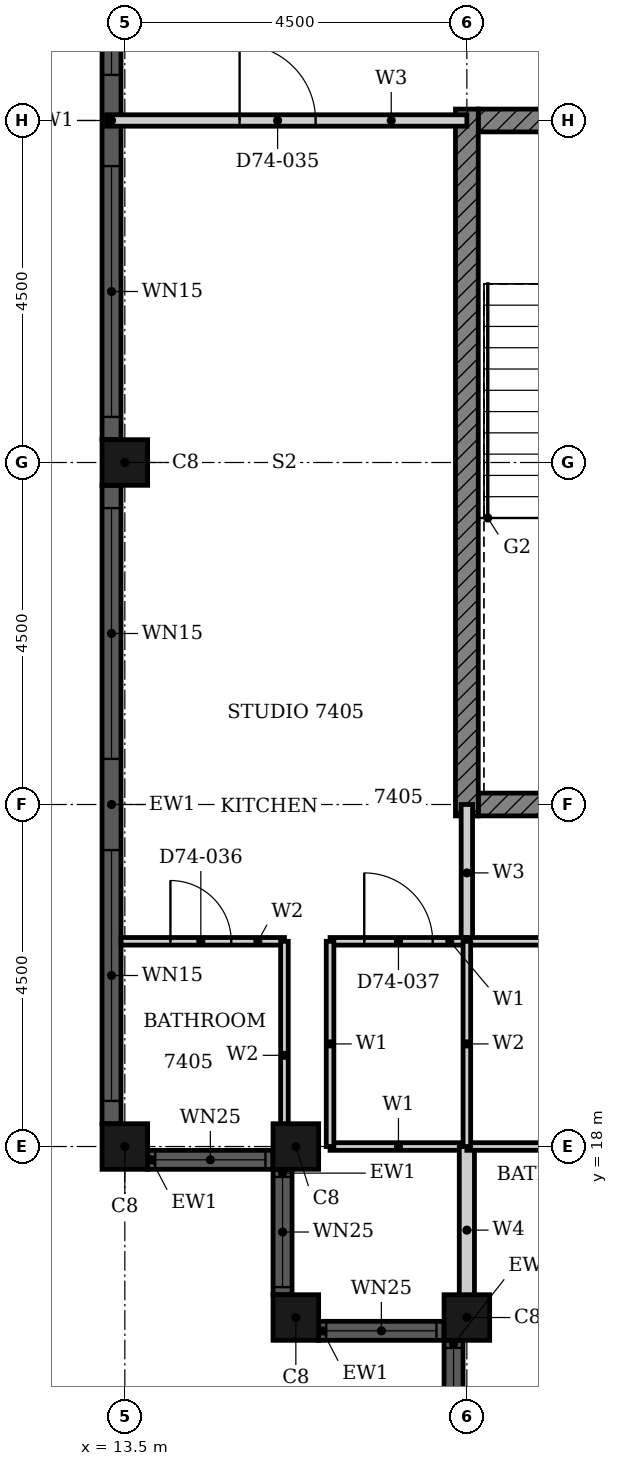
"""IFC4 building model, lengths in metres.
Left out: names, types, materials, properties, quantities, classifications, styles, units other than length and angle.
Written with IfcOpenShell. Run it as: python <this file> out.ifc"""

import sys

from ifc_helpers import new_model, si_unit, direction, frame, frame_2d, origin, origin_2d, place, context, subcontext, project, spatial, rectangle, hollow_rectangle, extrude, element, fill, save


model = new_model("IFC4")
c1 = context("Model", 3, precision=1e-05, world=origin(), true_north=direction((0.0, 1.0)))
c2 = subcontext(c1, "Body", "Model", "MODEL_VIEW")
j1 = project(units=[si_unit("LENGTHUNIT", "METRE"), si_unit("PLANEANGLEUNIT", "RADIAN")], contexts=[c1])
p1 = place(None, origin())
s1 = spatial("IfcSite", under=j1, at=p1, CompositionType="ELEMENT")
p2 = place(p1, origin())
s2 = spatial("IfcBuilding", under=s1, at=p2, CompositionType="ELEMENT")
p3 = place(p2, frame((0.0, 0.0, 290.8)))
s3 = spatial("IfcBuildingStorey", under=s2, at=p3, CompositionType="ELEMENT", Elevation=290.8)
for number, where, z_axis, x_axis in (
    (1, (13.5, 27.0, 0.0), (0.0, 0.0, 1.0), (1.0, 0.0, 0.0)),
    (2, (13.5, 18.0, 0.0), (0.0, 0.0, 1.0), (1.0, 0.0, 0.0)),
    (3, (15.75, 18.0, 0.0), (0.0, 0.0, 1.0), (1.0, 0.0, 0.0)),
    (4, (15.75, 15.75, 0.0), (0.0, 0.0, 1.0), (1.0, 0.0, 0.0)),
    (5, (18.0, 15.75, 0.0), (0.0, 0.0, 1.0), (1.0, 0.0, 0.0)),
):
    element("IfcColumn", number, at=place(p3, frame(where, z_axis=z_axis, x_axis=x_axis)), inside=s3, PredefinedType="COLUMN", context=c2, shape_type="SweptSolid", body=[
        extrude(hollow_rectangle(XDim=0.6, YDim=0.6, WallThickness=0.02, at=origin_2d()), origin(), (0.0, 0.0, 1.0), 3.7),
    ])
p4 = place(p3, frame((13.325, 35.7, 0.0), z_axis=(0.0, 0.0, 1.0), x_axis=(0.0, -1.0, 0.0)))
e6 = element("IfcWall", 6, at=p4, inside=s3, PredefinedType="SOLIDWALL", context=c2, shape_type="SweptSolid", body=[
    extrude(rectangle(XDim=8.4, YDim=0.25, at=frame_2d((4.2, 0.0))), origin(), (0.0, 0.0, 1.0), 3.7),
])
p5 = place(p4, frame((0.3, 0.0, 0.45)))
e7 = element("IfcOpeningElement", 7, at=p5, cuts=e6, PredefinedType="OPENING", context=c2, shape_type="SweptSolid", body=[
    extrude(rectangle(XDim=3.3, YDim=2.3, at=frame_2d((1.65, 1.15))), frame((0.0, 0.135, 0.0), z_axis=(0.0, -1.0, 0.0), x_axis=(1.0, 0.0, 0.0)), (0.0, 0.0, 1.0), 0.27),
])
p6 = place(p4, frame((4.8, 0.0, 0.45)))
e8 = element("IfcOpeningElement", 8, at=p6, cuts=e6, PredefinedType="OPENING", context=c2, shape_type="SweptSolid", body=[
    extrude(rectangle(XDim=3.3, YDim=2.3, at=frame_2d((1.65, 1.15))), frame((0.0, 0.135, 0.0), z_axis=(0.0, -1.0, 0.0), x_axis=(1.0, 0.0, 0.0)), (0.0, 0.0, 1.0), 0.27),
])
p7 = place(p3, frame((13.325, 26.7, 0.0), z_axis=(0.0, 0.0, 1.0), x_axis=(0.0, -1.0, 0.0)))
e9 = element("IfcWall", 9, at=p7, inside=s3, PredefinedType="SOLIDWALL", context=c2, shape_type="SweptSolid", body=[
    extrude(rectangle(XDim=8.4, YDim=0.25, at=frame_2d((4.2, 0.0))), origin(), (0.0, 0.0, 1.0), 3.7),
])
p8 = place(p7, frame((0.3, 0.0, 0.45)))
e10 = element("IfcOpeningElement", 10, at=p8, cuts=e9, PredefinedType="OPENING", context=c2, shape_type="SweptSolid", body=[
    extrude(rectangle(XDim=3.3, YDim=2.3, at=frame_2d((1.65, 1.15))), frame((0.0, 0.135, 0.0), z_axis=(0.0, -1.0, 0.0), x_axis=(1.0, 0.0, 0.0)), (0.0, 0.0, 1.0), 0.27),
])
p9 = place(p7, frame((4.8, 0.0, 0.45)))
e11 = element("IfcOpeningElement", 11, at=p9, cuts=e9, PredefinedType="OPENING", context=c2, shape_type="SweptSolid", body=[
    extrude(rectangle(XDim=3.3, YDim=2.3, at=frame_2d((1.65, 1.15))), frame((0.0, 0.135, 0.0), z_axis=(0.0, -1.0, 0.0), x_axis=(1.0, 0.0, 0.0)), (0.0, 0.0, 1.0), 0.27),
])
p10 = place(p3, frame((13.8, 17.825, 0.0), z_axis=(0.0, 0.0, 1.0), x_axis=(1.0, 0.0, 0.0)))
e12 = element("IfcWall", 12, at=p10, inside=s3, PredefinedType="SOLIDWALL", context=c2, shape_type="SweptSolid", body=[
    extrude(rectangle(XDim=1.65, YDim=0.25, at=frame_2d((0.825, 0.0))), origin(), (0.0, 0.0, 1.0), 3.7),
])
p11 = place(p10, frame((0.1, 0.0, 0.9)))
e13 = element("IfcOpeningElement", 13, at=p11, cuts=e12, PredefinedType="OPENING", context=c2, shape_type="SweptSolid", body=[
    extrude(rectangle(XDim=1.45, YDim=1.85, at=frame_2d((0.725, 0.925))), frame((0.0, 0.135, 0.0), z_axis=(0.0, -1.0, 0.0), x_axis=(1.0, 0.0, 0.0)), (0.0, 0.0, 1.0), 0.27),
])
p12 = place(p3, frame((15.575, 17.7, 0.0), z_axis=(0.0, 0.0, 1.0), x_axis=(0.0, -1.0, 0.0)))
e14 = element("IfcWall", 14, at=p12, inside=s3, PredefinedType="SOLIDWALL", context=c2, shape_type="SweptSolid", body=[
    extrude(rectangle(XDim=1.65, YDim=0.25, at=frame_2d((0.825, 0.0))), origin(), (0.0, 0.0, 1.0), 3.7),
])
p13 = place(p12, frame((0.1, 0.0, 0.9)))
e15 = element("IfcOpeningElement", 15, at=p13, cuts=e14, PredefinedType="OPENING", context=c2, shape_type="SweptSolid", body=[
    extrude(rectangle(XDim=1.45, YDim=1.85, at=frame_2d((0.725, 0.925))), frame((0.0, 0.135, 0.0), z_axis=(0.0, -1.0, 0.0), x_axis=(1.0, 0.0, 0.0)), (0.0, 0.0, 1.0), 0.27),
])
p14 = place(p3, frame((16.05, 15.575, 0.0), z_axis=(0.0, 0.0, 1.0), x_axis=(1.0, 0.0, 0.0)))
e16 = element("IfcWall", 16, at=p14, inside=s3, PredefinedType="SOLIDWALL", context=c2, shape_type="SweptSolid", body=[
    extrude(rectangle(XDim=1.65, YDim=0.25, at=frame_2d((0.825, 0.0))), origin(), (0.0, 0.0, 1.0), 3.7),
])
p15 = place(p14, frame((0.1, 0.0, 0.9)))
e17 = element("IfcOpeningElement", 17, at=p15, cuts=e16, PredefinedType="OPENING", context=c2, shape_type="SweptSolid", body=[
    extrude(rectangle(XDim=1.45, YDim=1.85, at=frame_2d((0.725, 0.925))), frame((0.0, 0.135, 0.0), z_axis=(0.0, -1.0, 0.0), x_axis=(1.0, 0.0, 0.0)), (0.0, 0.0, 1.0), 0.27),
])
p16 = place(p3, frame((17.825, 15.45, 0.0), z_axis=(0.0, 0.0, 1.0), x_axis=(0.0, -1.0, 0.0)))
e18 = element("IfcWall", 18, at=p16, inside=s3, PredefinedType="SOLIDWALL", context=c2, shape_type="SweptSolid", body=[
    extrude(rectangle(XDim=1.65, YDim=0.25, at=frame_2d((0.825, 0.0))), origin(), (0.0, 0.0, 1.0), 3.7),
])
p17 = place(p16, frame((0.1, 0.0, 0.9)))
e19 = element("IfcOpeningElement", 19, at=p17, cuts=e18, PredefinedType="OPENING", context=c2, shape_type="SweptSolid", body=[
    extrude(rectangle(XDim=1.45, YDim=1.85, at=frame_2d((0.725, 0.925))), frame((0.0, 0.135, 0.0), z_axis=(0.0, -1.0, 0.0), x_axis=(1.0, 0.0, 0.0)), (0.0, 0.0, 1.0), 0.27),
])
p18 = place(p3, frame((18.15, 22.5, 0.0), z_axis=(0.0, 0.0, 1.0), x_axis=(1.0, 0.0, 0.0)))
e20 = element("IfcWall", 20, at=p18, inside=s3, PredefinedType="SHEAR", context=c2, shape_type="SweptSolid", body=[
    extrude(rectangle(XDim=4.225, YDim=0.3, at=frame_2d((2.113, 0.0))), origin(), (0.0, 0.0, 1.0), 3.4),
])
p19 = place(p3, frame((18.15, 31.5, 0.0), z_axis=(0.0, 0.0, 1.0), x_axis=(1.0, 0.0, 0.0)))
e21 = element("IfcWall", 21, at=p19, inside=s3, PredefinedType="SHEAR", context=c2, shape_type="SweptSolid", body=[
    extrude(rectangle(XDim=9.368, YDim=0.3, at=frame_2d((4.684, 0.0))), origin(), (0.0, 0.0, 1.0), 3.4),
])
p20 = place(p19, frame((4.736, 0.0, 0.0)))
e22 = element("IfcOpeningElement", 22, at=p20, cuts=e21, PredefinedType="OPENING", context=c2, shape_type="SweptSolid", body=[
    extrude(rectangle(XDim=1.8, YDim=2.1, at=frame_2d((0.9, 1.05))), frame((0.0, 0.16, 0.0), z_axis=(0.0, -1.0, 0.0), x_axis=(1.0, 0.0, 0.0)), (0.0, 0.0, 1.0), 0.32),
])
p21 = place(p3, frame((18.0, 22.35, 0.0), z_axis=(0.0, 0.0, 1.0), x_axis=(0.0, 1.0, 0.0)))
e23 = element("IfcWall", 23, at=p21, inside=s3, PredefinedType="SHEAR", context=c2, shape_type="SweptSolid", body=[
    extrude(rectangle(XDim=9.3, YDim=0.3, at=frame_2d((4.65, 0.0))), origin(), (0.0, 0.0, 1.0), 3.4),
])
p22 = place(p3, frame((13.26, 31.5, 0.0), z_axis=(0.0, 0.0, 1.0), x_axis=(1.0, 0.0, 0.0)))
e24 = element("IfcWall", 24, at=p22, inside=s3, PredefinedType="PARTITIONING", context=c2, shape_type="SweptSolid", body=[
    extrude(rectangle(XDim=4.74, YDim=0.15, at=frame_2d((2.37, 0.0))), origin(), (0.0, 0.0, 1.0), 3.4),
])
p23 = place(p22, frame((1.75, 0.0, 0.0)))
e25 = element("IfcOpeningElement", 25, at=p23, cuts=e24, PredefinedType="OPENING", context=c2, shape_type="SweptSolid", body=[
    extrude(rectangle(XDim=1.0, YDim=2.2, at=frame_2d((0.5, 1.1))), frame((0.0, 0.085, 0.0), z_axis=(0.0, -1.0, 0.0), x_axis=(1.0, 0.0, 0.0)), (0.0, 0.0, 1.0), 0.17),
])
p24 = place(p3, frame((18.0, 20.7, 0.0), z_axis=(0.0, 0.0, 1.0), x_axis=(0.0, 1.0, 0.0)))
e26 = element("IfcWall", 26, at=p24, inside=s3, PredefinedType="PARTITIONING", context=c2, shape_type="SweptSolid", body=[
    extrude(rectangle(XDim=1.8, YDim=0.15, at=frame_2d((0.9, 0.0))), origin(), (0.0, 0.0, 1.0), 3.4),
])
p25 = place(p3, frame((16.2, 18.0, 0.0), z_axis=(0.0, 0.0, 1.0), x_axis=(1.0, 0.0, 0.0)))
e27 = element("IfcWall", 27, at=p25, inside=s3, PredefinedType="PARTITIONING", context=c2, shape_type="SweptSolid", body=[
    extrude(rectangle(XDim=1.8, YDim=0.1, at=frame_2d((0.9, 0.0))), origin(), (0.0, 0.0, 1.0), 3.4),
])
p26 = place(p3, frame((16.2, 20.7, 0.0), z_axis=(0.0, 0.0, 1.0), x_axis=(1.0, 0.0, 0.0)))
e28 = element("IfcWall", 28, at=p26, inside=s3, PredefinedType="PARTITIONING", context=c2, shape_type="SweptSolid", body=[
    extrude(rectangle(XDim=1.8, YDim=0.1, at=frame_2d((0.9, 0.0))), origin(), (0.0, 0.0, 1.0), 3.4),
])
p27 = place(p26, frame((0.45, 0.0, 0.0)))
e29 = element("IfcOpeningElement", 29, at=p27, cuts=e28, PredefinedType="OPENING", context=c2, shape_type="SweptSolid", body=[
    extrude(rectangle(XDim=0.9, YDim=2.1, at=frame_2d((0.45, 1.05))), frame((0.0, 0.06, 0.0), z_axis=(0.0, -1.0, 0.0), x_axis=(1.0, 0.0, 0.0)), (0.0, 0.0, 1.0), 0.12),
])
p28 = place(p3, frame((16.2, 18.0, 0.0), z_axis=(0.0, 0.0, 1.0), x_axis=(0.0, 1.0, 0.0)))
e30 = element("IfcWall", 30, at=p28, inside=s3, PredefinedType="PARTITIONING", context=c2, shape_type="SweptSolid", body=[
    extrude(rectangle(XDim=2.7, YDim=0.1, at=frame_2d((1.35, 0.0))), origin(), (0.0, 0.0, 1.0), 3.4),
])
p29 = place(p3, frame((18.0, 15.8, 0.0), z_axis=(0.0, 0.0, 1.0), x_axis=(0.0, 1.0, 0.0)))
e31 = element("IfcWall", 31, at=p29, inside=s3, PredefinedType="PARTITIONING", context=c2, shape_type="SweptSolid", body=[
    extrude(rectangle(XDim=2.2, YDim=0.2, at=frame_2d((1.1, 0.0))), origin(), (0.0, 0.0, 1.0), 3.4),
])
for number, where, z_axis, x_axis in (
    (32, (18.0, 18.0, 0.0), (0.0, 0.0, 1.0), (1.0, 0.0, 0.0)),
    (33, (18.0, 20.7, 0.0), (0.0, 0.0, 1.0), (1.0, 0.0, 0.0)),
):
    element("IfcWall", number, at=place(p3, frame(where, z_axis=z_axis, x_axis=x_axis)), inside=s3, PredefinedType="PARTITIONING", context=c2, shape_type="SweptSolid", body=[
        extrude(rectangle(XDim=2.4, YDim=0.1, at=frame_2d((1.2, 0.0))), origin(), (0.0, 0.0, 1.0), 3.4),
    ])
p30 = place(p3, frame((13.45, 20.7, 0.0), z_axis=(0.0, 0.0, 1.0), x_axis=(1.0, 0.0, 0.0)))
e34 = element("IfcWall", 34, at=p30, inside=s3, PredefinedType="PARTITIONING", context=c2, shape_type="SweptSolid", body=[
    extrude(rectangle(XDim=2.15, YDim=0.1, at=frame_2d((1.075, 0.0))), origin(), (0.0, 0.0, 1.0), 3.4),
])
p31 = place(p30, frame((0.65, 0.0, 0.0)))
e35 = element("IfcOpeningElement", 35, at=p31, cuts=e34, PredefinedType="OPENING", context=c2, shape_type="SweptSolid", body=[
    extrude(rectangle(XDim=0.8, YDim=2.1, at=frame_2d((0.4, 1.05))), frame((0.0, 0.06, 0.0), z_axis=(0.0, -1.0, 0.0), x_axis=(1.0, 0.0, 0.0)), (0.0, 0.0, 1.0), 0.12),
])
p32 = place(p3, frame((15.6, 17.7, 0.0), z_axis=(0.0, 0.0, 1.0), x_axis=(0.0, 1.0, 0.0)))
e36 = element("IfcWall", 36, at=p32, inside=s3, PredefinedType="PARTITIONING", context=c2, shape_type="SweptSolid", body=[
    extrude(rectangle(XDim=3.0, YDim=0.1, at=frame_2d((1.5, 0.0))), origin(), (0.0, 0.0, 1.0), 3.4),
])
p33 = place(p3, frame((18.0, 18.0, 0.0), z_axis=(0.0, 0.0, 1.0), x_axis=(0.0, 1.0, 0.0)))
e37 = element("IfcWall", 37, at=p33, inside=s3, PredefinedType="PARTITIONING", context=c2, shape_type="SweptSolid", body=[
    extrude(rectangle(XDim=2.7, YDim=0.1, at=frame_2d((1.35, 0.0))), origin(), (0.0, 0.0, 1.0), 3.4),
])
p34 = place(p5, origin())
e38 = element("IfcWindow", 38, at=p34, inside=s3, PartitioningType="SINGLE_PANEL", PredefinedType="WINDOW", context=c2, shape_type="SweptSolid", body=[
    extrude(rectangle(XDim=3.3, YDim=2.3, at=frame_2d((1.65, 1.15))), frame((0.0, 0.03, 0.0), z_axis=(0.0, -1.0, 0.0), x_axis=(1.0, 0.0, 0.0)), (0.0, 0.0, 1.0), 0.06),
])
fill(e7, e38)
p35 = place(p6, origin())
e39 = element("IfcWindow", 39, at=p35, inside=s3, PartitioningType="SINGLE_PANEL", PredefinedType="WINDOW", context=c2, shape_type="SweptSolid", body=[
    extrude(rectangle(XDim=3.3, YDim=2.3, at=frame_2d((1.65, 1.15))), frame((0.0, 0.03, 0.0), z_axis=(0.0, -1.0, 0.0), x_axis=(1.0, 0.0, 0.0)), (0.0, 0.0, 1.0), 0.06),
])
fill(e8, e39)
p36 = place(p8, origin())
e40 = element("IfcWindow", 40, at=p36, inside=s3, PartitioningType="SINGLE_PANEL", PredefinedType="WINDOW", context=c2, shape_type="SweptSolid", body=[
    extrude(rectangle(XDim=3.3, YDim=2.3, at=frame_2d((1.65, 1.15))), frame((0.0, 0.03, 0.0), z_axis=(0.0, -1.0, 0.0), x_axis=(1.0, 0.0, 0.0)), (0.0, 0.0, 1.0), 0.06),
])
fill(e10, e40)
p37 = place(p9, origin())
e41 = element("IfcWindow", 41, at=p37, inside=s3, PartitioningType="SINGLE_PANEL", PredefinedType="WINDOW", context=c2, shape_type="SweptSolid", body=[
    extrude(rectangle(XDim=3.3, YDim=2.3, at=frame_2d((1.65, 1.15))), frame((0.0, 0.03, 0.0), z_axis=(0.0, -1.0, 0.0), x_axis=(1.0, 0.0, 0.0)), (0.0, 0.0, 1.0), 0.06),
])
fill(e11, e41)
p38 = place(p11, origin())
e42 = element("IfcWindow", 42, at=p38, inside=s3, PartitioningType="SINGLE_PANEL", PredefinedType="WINDOW", context=c2, shape_type="SweptSolid", body=[
    extrude(rectangle(XDim=1.45, YDim=1.85, at=frame_2d((0.725, 0.925))), frame((0.0, 0.03, 0.0), z_axis=(0.0, -1.0, 0.0), x_axis=(1.0, 0.0, 0.0)), (0.0, 0.0, 1.0), 0.06),
])
fill(e13, e42)
p39 = place(p13, origin())
e43 = element("IfcWindow", 43, at=p39, inside=s3, PartitioningType="SINGLE_PANEL", PredefinedType="WINDOW", context=c2, shape_type="SweptSolid", body=[
    extrude(rectangle(XDim=1.45, YDim=1.85, at=frame_2d((0.725, 0.925))), frame((0.0, 0.03, 0.0), z_axis=(0.0, -1.0, 0.0), x_axis=(1.0, 0.0, 0.0)), (0.0, 0.0, 1.0), 0.06),
])
fill(e15, e43)
p40 = place(p15, origin())
e44 = element("IfcWindow", 44, at=p40, inside=s3, PartitioningType="SINGLE_PANEL", PredefinedType="WINDOW", context=c2, shape_type="SweptSolid", body=[
    extrude(rectangle(XDim=1.45, YDim=1.85, at=frame_2d((0.725, 0.925))), frame((0.0, 0.03, 0.0), z_axis=(0.0, -1.0, 0.0), x_axis=(1.0, 0.0, 0.0)), (0.0, 0.0, 1.0), 0.06),
])
fill(e17, e44)
p41 = place(p17, origin())
e45 = element("IfcWindow", 45, at=p41, inside=s3, PartitioningType="SINGLE_PANEL", PredefinedType="WINDOW", context=c2, shape_type="SweptSolid", body=[
    extrude(rectangle(XDim=1.45, YDim=1.85, at=frame_2d((0.725, 0.925))), frame((0.0, 0.03, 0.0), z_axis=(0.0, -1.0, 0.0), x_axis=(1.0, 0.0, 0.0)), (0.0, 0.0, 1.0), 0.06),
])
fill(e19, e45)
p42 = place(p23, origin())
e46 = element("IfcDoor", 46, at=p42, inside=s3, OperationType="SINGLE_SWING_RIGHT", PredefinedType="DOOR", context=c2, shape_type="SweptSolid", body=[
    extrude(rectangle(XDim=1.0, YDim=2.2, at=frame_2d((0.5, 1.1))), frame((0.0, 0.025, 0.0), z_axis=(0.0, -1.0, 0.0), x_axis=(1.0, 0.0, 0.0)), (0.0, 0.0, 1.0), 0.05),
])
fill(e25, e46)
p43 = place(p31, origin())
e47 = element("IfcDoor", 47, at=p43, inside=s3, OperationType="SINGLE_SWING_RIGHT", PredefinedType="DOOR", context=c2, shape_type="SweptSolid", body=[
    extrude(rectangle(XDim=0.8, YDim=2.1, at=frame_2d((0.4, 1.05))), frame((0.0, 0.025, 0.0), z_axis=(0.0, -1.0, 0.0), x_axis=(1.0, 0.0, 0.0)), (0.0, 0.0, 1.0), 0.05),
])
fill(e35, e47)
p44 = place(p27, origin())
e48 = element("IfcDoor", 48, at=p44, inside=s3, OperationType="SINGLE_SWING_RIGHT", PredefinedType="DOOR", context=c2, shape_type="SweptSolid", body=[
    extrude(rectangle(XDim=0.9, YDim=2.1, at=frame_2d((0.45, 1.05))), frame((0.0, 0.025, 0.0), z_axis=(0.0, -1.0, 0.0), x_axis=(1.0, 0.0, 0.0)), (0.0, 0.0, 1.0), 0.05),
])
fill(e29, e48)
save(model, sys.argv[1])
